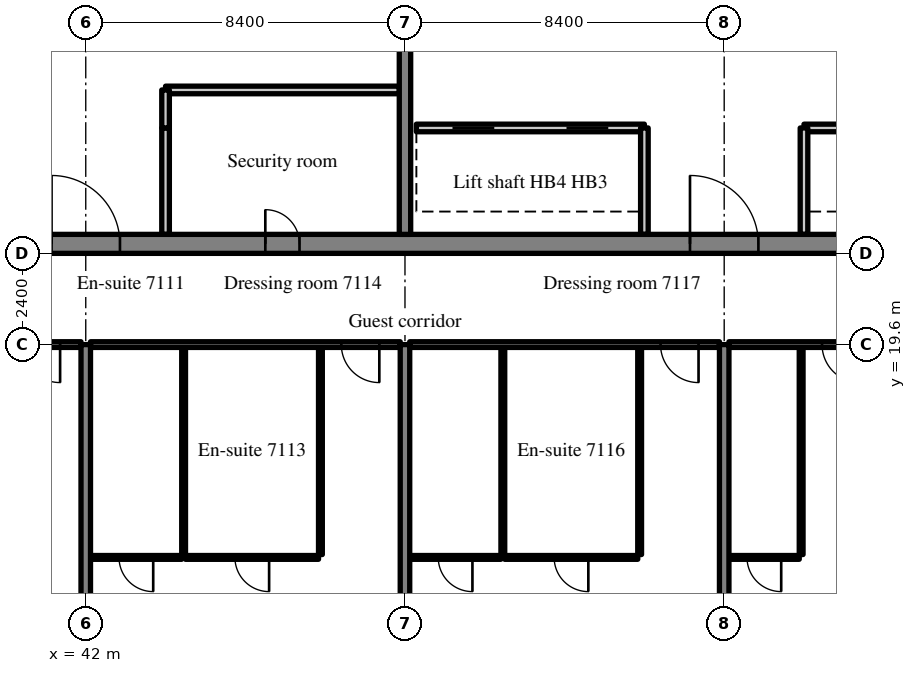
"""IFC4 building model, lengths in metres.
Left out: names, types, materials, properties, quantities, classifications, styles, units other than length and angle.
Written with IfcOpenShell. Run it as: python <this file> out.ifc"""

import sys

from ifc_helpers import new_model, si_unit, direction, frame, frame_2d, origin, place, context, subcontext, project, spatial, rectangle, extrude, source, transform, mapped, element, fill, save


model = new_model("IFC4")
c1 = context("Model", 3, precision=1e-05, world=origin(), true_north=direction((0.0, 1.0)))
c2 = subcontext(c1, "Body", "Model", "MODEL_VIEW")
j1 = project(units=[si_unit("LENGTHUNIT", "METRE"), si_unit("PLANEANGLEUNIT", "RADIAN")], contexts=[c1])
p1 = place(None, origin())
s1 = spatial("IfcSite", under=j1, at=p1, CompositionType="ELEMENT")
p2 = place(p1, origin())
s2 = spatial("IfcBuilding", under=s1, at=p2, CompositionType="ELEMENT")
p3 = place(p2, frame((0.0, 0.0, 297.7)))
s3 = spatial("IfcBuildingStorey", under=s2, at=p3, CompositionType="ELEMENT", Elevation=297.7)
m1 = source(origin(), c2, "Body", "SweptSolid", [
    extrude(rectangle(XDim=50.4, YDim=0.5, at=frame_2d((25.2, 0.0))), origin(), (0.0, 0.0, 1.0), 3.72),
])
p4 = place(p3, frame((25.2, 22.25, 0.0), z_axis=(0.0, 0.0, 1.0), x_axis=(1.0, 0.0, 0.0)))
e1 = element("IfcWall", 1, at=p4, inside=s3, PredefinedType="SHEAR", context=c2, shape_type="MappedRepresentation", body=[
    mapped(m1, transform((0.0, 0.0, 0.0), scale=1.0)),
])
m2 = source(origin(), c2, "Body", "SweptSolid", [
    extrude(rectangle(XDim=1.8, YDim=2.1, at=frame_2d((0.9, 1.05))), frame((0.0, 0.26, 0.0), z_axis=(0.0, -1.0, 0.0), x_axis=(1.0, 0.0, 0.0)), (0.0, 0.0, 1.0), 0.52),
])
p5 = place(p4, frame((15.9, 0.0, 0.0)))
e2 = element("IfcOpeningElement", 2, at=p5, cuts=e1, PredefinedType="OPENING", context=c2, shape_type="MappedRepresentation", body=[
    mapped(m2, transform((0.0, 0.0, 0.0), scale=1.0)),
])
m3 = source(origin(), c2, "Body", "SweptSolid", [
    extrude(rectangle(XDim=0.9, YDim=2.1, at=frame_2d((0.45, 1.05))), frame((0.0, 0.26, 0.0), z_axis=(0.0, -1.0, 0.0), x_axis=(1.0, 0.0, 0.0)), (0.0, 0.0, 1.0), 0.52),
])
p6 = place(p4, frame((9.675, 0.0, 0.0)))
e3 = element("IfcOpeningElement", 3, at=p6, cuts=e1, PredefinedType="OPENING", context=c2, shape_type="MappedRepresentation", body=[
    mapped(m3, transform((0.0, 0.0, 0.0), scale=1.0)),
])
p7 = place(p4, frame((21.525, 0.0, 0.0)))
e4 = element("IfcOpeningElement", 4, at=p7, cuts=e1, PredefinedType="OPENING", context=c2, shape_type="MappedRepresentation", body=[
    mapped(m3, transform((0.0, 0.0, 0.0), scale=1.0)),
])
p8 = place(p4, frame((32.7, 0.0, 0.0)))
e5 = element("IfcOpeningElement", 5, at=p8, cuts=e1, PredefinedType="OPENING", context=c2, shape_type="MappedRepresentation", body=[
    mapped(m2, transform((0.0, 0.0, 0.0), scale=1.0)),
])
m4 = source(origin(), c2, "Body", "SweptSolid", [
    extrude(rectangle(XDim=1.2, YDim=2.1, at=frame_2d((0.6, 1.05))), frame((0.0, 0.26, 0.0), z_axis=(0.0, -1.0, 0.0), x_axis=(1.0, 0.0, 0.0)), (0.0, 0.0, 1.0), 0.52),
])
p9 = place(p4, frame((6.5, 0.0, 0.0)))
e6 = element("IfcOpeningElement", 6, at=p9, cuts=e1, PredefinedType="OPENING", context=c2, shape_type="MappedRepresentation", body=[
    mapped(m4, transform((0.0, 0.0, 0.0), scale=1.0)),
])
p10 = place(p4, frame((47.975, 0.0, 0.0)))
e7 = element("IfcOpeningElement", 7, at=p10, cuts=e1, PredefinedType="OPENING", context=c2, shape_type="MappedRepresentation", body=[
    mapped(m4, transform((0.0, 0.0, 0.0), scale=1.0)),
])
m5 = source(origin(), c2, "Body", "SweptSolid", [
    extrude(rectangle(XDim=19.0, YDim=0.3, at=frame_2d((9.5, 0.0))), origin(), (0.0, 0.0, 1.0), 3.72),
])
p11 = place(p3, frame((50.4, 22.5, 0.0), z_axis=(0.0, 0.0, 1.0), x_axis=(0.0, 1.0, 0.0)))
e8 = element("IfcWall", 8, at=p11, inside=s3, PredefinedType="SHEAR", context=c2, shape_type="MappedRepresentation", body=[
    mapped(m5, transform((0.0, 0.0, 0.0), scale=1.0)),
])
m6 = source(origin(), c2, "Body", "SweptSolid", [
    extrude(rectangle(XDim=1.1, YDim=2.1, at=frame_2d((0.55, 1.05))), frame((0.0, 0.16, 0.0), z_axis=(0.0, -1.0, 0.0), x_axis=(1.0, 0.0, 0.0)), (0.0, 0.0, 1.0), 0.32),
])
p12 = place(p11, frame((12.95, 0.0, 0.0)))
e9 = element("IfcOpeningElement", 9, at=p12, cuts=e8, PredefinedType="OPENING", context=c2, shape_type="MappedRepresentation", body=[
    mapped(m6, transform((0.0, 0.0, 0.0), scale=1.0)),
])
m7 = source(origin(), c2, "Body", "SweptSolid", [
    extrude(rectangle(XDim=14.1, YDim=0.25, at=frame_2d((7.05, 0.0))), origin(), (0.0, 0.0, 1.0), 3.72),
])
p13 = place(p3, frame((42.0, 5.5, 0.0), z_axis=(0.0, 0.0, 1.0), x_axis=(0.0, 1.0, 0.0)))
e10 = element("IfcWall", 10, at=p13, inside=s3, PredefinedType="SHEAR", context=c2, shape_type="MappedRepresentation", body=[
    mapped(m7, transform((0.0, 0.0, 0.0), scale=1.0)),
])
m8 = source(origin(), c2, "Body", "SweptSolid", [
    extrude(rectangle(XDim=13.1, YDim=0.25, at=frame_2d((6.55, 0.0))), origin(), (0.0, 0.0, 1.0), 3.72),
])
p14 = place(p3, frame((50.4, 6.5, 0.0), z_axis=(0.0, 0.0, 1.0), x_axis=(0.0, 1.0, 0.0)))
e11 = element("IfcWall", 11, at=p14, inside=s3, PredefinedType="SHEAR", context=c2, shape_type="MappedRepresentation", body=[
    mapped(m8, transform((0.0, 0.0, 0.0), scale=1.0)),
])
p15 = place(p3, frame((58.8, 5.5, 0.0), z_axis=(0.0, 0.0, 1.0), x_axis=(0.0, 1.0, 0.0)))
e12 = element("IfcWall", 12, at=p15, inside=s3, PredefinedType="SHEAR", context=c2, shape_type="MappedRepresentation", body=[
    mapped(m7, transform((0.0, 0.0, 0.0), scale=1.0)),
])
m9 = source(origin(), c2, "Body", "SweptSolid", [
    extrude(rectangle(XDim=2.8, YDim=0.2, at=frame_2d((1.4, 0.0))), origin(), (0.0, 0.0, 1.0), 3.72),
])
p16 = place(p3, frame((44.1, 22.5, 0.0), z_axis=(0.0, 0.0, 1.0), x_axis=(0.0, 1.0, 0.0)))
e13 = element("IfcWall", 13, at=p16, inside=s3, PredefinedType="PARTITIONING", context=c2, shape_type="MappedRepresentation", body=[
    mapped(m9, transform((0.0, 0.0, 0.0), scale=1.0)),
])
m10 = source(origin(), c2, "Body", "SweptSolid", [
    extrude(rectangle(XDim=6.15, YDim=0.2, at=frame_2d((3.075, 0.0))), origin(), (0.0, 0.0, 1.0), 3.72),
])
p17 = place(p3, frame((44.1, 26.3, 0.0), z_axis=(0.0, 0.0, 1.0), x_axis=(1.0, 0.0, 0.0)))
e14 = element("IfcWall", 14, at=p17, inside=s3, PredefinedType="PARTITIONING", context=c2, shape_type="MappedRepresentation", body=[
    mapped(m10, transform((0.0, 0.0, 0.0), scale=1.0)),
])
m11 = source(origin(), c2, "Body", "SweptSolid", [
    extrude(rectangle(XDim=1.0, YDim=0.2, at=frame_2d((0.5, 0.0))), origin(), (0.0, 0.0, 1.0), 3.72),
])
p18 = place(p3, frame((44.1, 25.3, 0.0), z_axis=(0.0, 0.0, 1.0), x_axis=(0.0, 1.0, 0.0)))
e15 = element("IfcWall", 15, at=p18, inside=s3, PredefinedType="PARTITIONING", context=c2, shape_type="MappedRepresentation", body=[
    mapped(m11, transform((0.0, 0.0, 0.0), scale=1.0)),
])
m12 = source(origin(), c2, "Body", "SweptSolid", [
    extrude(rectangle(XDim=6.15, YDim=0.2, at=frame_2d((3.075, 0.0))), origin(), (0.0, 0.0, 1.0), 3.72),
])
p19 = place(p3, frame((67.05, 25.3, 0.0), z_axis=(0.0, 0.0, 1.0), x_axis=(-1.0, 0.0, 0.0)))
e16 = element("IfcWall", 16, at=p19, inside=s3, PredefinedType="SOLIDWALL", context=c2, shape_type="MappedRepresentation", body=[
    mapped(m12, transform((0.0, 0.0, 0.0), scale=1.0)),
])
m13 = source(origin(), c2, "Body", "SweptSolid", [
    extrude(rectangle(XDim=1.1, YDim=2.1, at=frame_2d((0.55, 1.05))), frame((0.0, 0.11, 0.0), z_axis=(0.0, -1.0, 0.0), x_axis=(1.0, 0.0, 0.0)), (0.0, 0.0, 1.0), 0.22),
])
p20 = place(p19, frame((1.1, 0.0, 0.0)))
e17 = element("IfcOpeningElement", 17, at=p20, cuts=e16, PredefinedType="OPENING", context=c2, shape_type="MappedRepresentation", body=[
    mapped(m13, transform((0.0, 0.0, 0.0), scale=1.0)),
])
p21 = place(p19, frame((4.1, 0.0, 0.0)))
e18 = element("IfcOpeningElement", 18, at=p21, cuts=e16, PredefinedType="OPENING", context=c2, shape_type="MappedRepresentation", body=[
    mapped(m13, transform((0.0, 0.0, 0.0), scale=1.0)),
])
m14 = source(origin(), c2, "Body", "SweptSolid", [
    extrude(rectangle(XDim=6.0, YDim=0.2, at=frame_2d((3.0, 0.0))), origin(), (0.0, 0.0, 1.0), 3.72),
])
p22 = place(p3, frame((56.7, 25.3, 0.0), z_axis=(0.0, 0.0, 1.0), x_axis=(-1.0, 0.0, 0.0)))
e19 = element("IfcWall", 19, at=p22, inside=s3, PredefinedType="SOLIDWALL", context=c2, shape_type="MappedRepresentation", body=[
    mapped(m14, transform((0.0, 0.0, 0.0), scale=1.0)),
])
p23 = place(p22, frame((0.95, 0.0, 0.0)))
e20 = element("IfcOpeningElement", 20, at=p23, cuts=e19, PredefinedType="OPENING", context=c2, shape_type="MappedRepresentation", body=[
    mapped(m13, transform((0.0, 0.0, 0.0), scale=1.0)),
])
p24 = place(p22, frame((3.95, 0.0, 0.0)))
e21 = element("IfcOpeningElement", 21, at=p24, cuts=e19, PredefinedType="OPENING", context=c2, shape_type="MappedRepresentation", body=[
    mapped(m13, transform((0.0, 0.0, 0.0), scale=1.0)),
])
for number, where, z_axis, x_axis in (
    (22, (60.9, 22.5, 0.0), (0.0, 0.0, 1.0), (0.0, 1.0, 0.0)),
    (23, (56.7, 22.5, 0.0), (0.0, 0.0, 1.0), (0.0, 1.0, 0.0)),
):
    element("IfcWall", number, at=place(p3, frame(where, z_axis=z_axis, x_axis=x_axis)), inside=s3, PredefinedType="SOLIDWALL", context=c2, shape_type="MappedRepresentation", body=[
        mapped(m9, transform((0.0, 0.0, 0.0), scale=1.0)),
    ])
m15 = source(origin(), c2, "Body", "SweptSolid", [
    extrude(rectangle(XDim=4.0, YDim=0.15, at=frame_2d((2.0, 0.0))), origin(), (0.0, 0.0, 1.0), 3.02),
])
p25 = place(p3, frame((37.875, 19.6, 0.0), z_axis=(0.0, 0.0, 1.0), x_axis=(1.0, 0.0, 0.0)))
e24 = element("IfcWall", 24, at=p25, inside=s3, PredefinedType="PARTITIONING", context=c2, shape_type="MappedRepresentation", body=[
    mapped(m15, transform((0.0, 0.0, 0.0), scale=1.0)),
])
m16 = source(origin(), c2, "Body", "SweptSolid", [
    extrude(rectangle(XDim=1.0, YDim=2.1, at=frame_2d((0.5, 1.05))), frame((0.0, 0.085, 0.0), z_axis=(0.0, -1.0, 0.0), x_axis=(1.0, 0.0, 0.0)), (0.0, 0.0, 1.0), 0.17),
])
p26 = place(p25, frame((2.45, 0.0, 0.0)))
e25 = element("IfcOpeningElement", 25, at=p26, cuts=e24, PredefinedType="OPENING", context=c2, shape_type="MappedRepresentation", body=[
    mapped(m16, transform((0.0, 0.0, 0.0), scale=1.0)),
])
m17 = source(origin(), c2, "Body", "SweptSolid", [
    extrude(rectangle(XDim=5.45, YDim=0.1, at=frame_2d((2.725, 0.0))), origin(), (0.0, 0.0, 1.0), 3.72),
])
for number, where, z_axis, x_axis in (
    (26, (48.175, 14.075, 0.0), (0.0, 0.0, 1.0), (0.0, 1.0, 0.0)),
    (27, (44.575, 14.075, 0.0), (0.0, 0.0, 1.0), (0.0, 1.0, 0.0)),
):
    element("IfcWall", number, at=place(p3, frame(where, z_axis=z_axis, x_axis=x_axis)), inside=s3, PredefinedType="PARTITIONING", context=c2, shape_type="MappedRepresentation", body=[
        mapped(m17, transform((0.0, 0.0, 0.0), scale=1.0)),
    ])
m18 = source(origin(), c2, "Body", "SweptSolid", [
    extrude(rectangle(XDim=3.5, YDim=0.1, at=frame_2d((1.75, 0.0))), origin(), (0.0, 0.0, 1.0), 3.72),
])
p27 = place(p3, frame((44.625, 14.0, 0.0), z_axis=(0.0, 0.0, 1.0), x_axis=(1.0, 0.0, 0.0)))
e28 = element("IfcWall", 28, at=p27, inside=s3, PredefinedType="PARTITIONING", context=c2, shape_type="MappedRepresentation", body=[
    mapped(m18, transform((0.0, 0.0, 0.0), scale=1.0)),
])
m19 = source(origin(), c2, "Body", "SweptSolid", [
    extrude(rectangle(XDim=0.9, YDim=2.1, at=frame_2d((0.45, 1.05))), frame((0.0, 0.06, 0.0), z_axis=(0.0, -1.0, 0.0), x_axis=(1.0, 0.0, 0.0)), (0.0, 0.0, 1.0), 0.12),
])
p28 = place(p27, frame((1.3, 0.0, 0.0)))
e29 = element("IfcOpeningElement", 29, at=p28, cuts=e28, PredefinedType="OPENING", context=c2, shape_type="MappedRepresentation", body=[
    mapped(m19, transform((0.0, 0.0, 0.0), scale=1.0)),
])
m20 = source(origin(), c2, "Body", "SweptSolid", [
    extrude(rectangle(XDim=2.4, YDim=0.1, at=frame_2d((1.2, 0.0))), origin(), (0.0, 0.0, 1.0), 3.72),
])
p29 = place(p3, frame((42.125, 14.0, 0.0), z_axis=(0.0, 0.0, 1.0), x_axis=(1.0, 0.0, 0.0)))
e30 = element("IfcWall", 30, at=p29, inside=s3, PredefinedType="PARTITIONING", context=c2, shape_type="MappedRepresentation", body=[
    mapped(m20, transform((0.0, 0.0, 0.0), scale=1.0)),
])
p30 = place(p29, frame((0.75, 0.0, 0.0)))
e31 = element("IfcOpeningElement", 31, at=p30, cuts=e30, PredefinedType="OPENING", context=c2, shape_type="MappedRepresentation", body=[
    mapped(m19, transform((0.0, 0.0, 0.0), scale=1.0)),
])
m21 = source(origin(), c2, "Body", "SweptSolid", [
    extrude(rectangle(XDim=8.15, YDim=0.15, at=frame_2d((4.075, 0.0))), origin(), (0.0, 0.0, 1.0), 3.02),
])
p31 = place(p3, frame((42.125, 19.6, 0.0), z_axis=(0.0, 0.0, 1.0), x_axis=(1.0, 0.0, 0.0)))
e32 = element("IfcWall", 32, at=p31, inside=s3, PredefinedType="PARTITIONING", context=c2, shape_type="MappedRepresentation", body=[
    mapped(m21, transform((0.0, 0.0, 0.0), scale=1.0)),
])
p32 = place(p31, frame((6.6, 0.0, 0.0)))
e33 = element("IfcOpeningElement", 33, at=p32, cuts=e32, PredefinedType="OPENING", context=c2, shape_type="MappedRepresentation", body=[
    mapped(m16, transform((0.0, 0.0, 0.0), scale=1.0)),
])
for number, where, z_axis, x_axis in (
    (34, (56.575, 14.075, 0.0), (0.0, 0.0, 1.0), (0.0, 1.0, 0.0)),
    (35, (52.975, 14.075, 0.0), (0.0, 0.0, 1.0), (0.0, 1.0, 0.0)),
):
    element("IfcWall", number, at=place(p3, frame(where, z_axis=z_axis, x_axis=x_axis)), inside=s3, PredefinedType="PARTITIONING", context=c2, shape_type="MappedRepresentation", body=[
        mapped(m17, transform((0.0, 0.0, 0.0), scale=1.0)),
    ])
p33 = place(p3, frame((53.025, 14.0, 0.0), z_axis=(0.0, 0.0, 1.0), x_axis=(1.0, 0.0, 0.0)))
e36 = element("IfcWall", 36, at=p33, inside=s3, PredefinedType="PARTITIONING", context=c2, shape_type="MappedRepresentation", body=[
    mapped(m18, transform((0.0, 0.0, 0.0), scale=1.0)),
])
p34 = place(p33, frame((1.3, 0.0, 0.0)))
e37 = element("IfcOpeningElement", 37, at=p34, cuts=e36, PredefinedType="OPENING", context=c2, shape_type="MappedRepresentation", body=[
    mapped(m19, transform((0.0, 0.0, 0.0), scale=1.0)),
])
m22 = source(origin(), c2, "Body", "SweptSolid", [
    extrude(rectangle(XDim=2.4, YDim=0.1, at=frame_2d((1.2, 0.0))), origin(), (0.0, 0.0, 1.0), 3.72),
])
p35 = place(p3, frame((50.525, 14.0, 0.0), z_axis=(0.0, 0.0, 1.0), x_axis=(1.0, 0.0, 0.0)))
e38 = element("IfcWall", 38, at=p35, inside=s3, PredefinedType="PARTITIONING", context=c2, shape_type="MappedRepresentation", body=[
    mapped(m22, transform((0.0, 0.0, 0.0), scale=1.0)),
])
p36 = place(p35, frame((0.75, 0.0, 0.0)))
e39 = element("IfcOpeningElement", 39, at=p36, cuts=e38, PredefinedType="OPENING", context=c2, shape_type="MappedRepresentation", body=[
    mapped(m19, transform((0.0, 0.0, 0.0), scale=1.0)),
])
m23 = source(origin(), c2, "Body", "SweptSolid", [
    extrude(rectangle(XDim=8.15, YDim=0.15, at=frame_2d((4.075, 0.0))), origin(), (0.0, 0.0, 1.0), 3.02),
])
p37 = place(p3, frame((50.525, 19.6, 0.0), z_axis=(0.0, 0.0, 1.0), x_axis=(1.0, 0.0, 0.0)))
e40 = element("IfcWall", 40, at=p37, inside=s3, PredefinedType="PARTITIONING", context=c2, shape_type="MappedRepresentation", body=[
    mapped(m23, transform((0.0, 0.0, 0.0), scale=1.0)),
])
p38 = place(p37, frame((6.6, 0.0, 0.0)))
e41 = element("IfcOpeningElement", 41, at=p38, cuts=e40, PredefinedType="OPENING", context=c2, shape_type="MappedRepresentation", body=[
    mapped(m16, transform((0.0, 0.0, 0.0), scale=1.0)),
])
p39 = place(p3, frame((60.825, 14.075, 0.0), z_axis=(0.0, 0.0, 1.0), x_axis=(0.0, 1.0, 0.0)))
e42 = element("IfcWall", 42, at=p39, inside=s3, PredefinedType="PARTITIONING", context=c2, shape_type="MappedRepresentation", body=[
    mapped(m17, transform((0.0, 0.0, 0.0), scale=1.0)),
])
m24 = source(origin(), c2, "Body", "SweptSolid", [
    extrude(rectangle(XDim=1.85, YDim=0.1, at=frame_2d((0.925, 0.0))), origin(), (0.0, 0.0, 1.0), 3.72),
])
p40 = place(p3, frame((58.925, 14.0, 0.0), z_axis=(0.0, 0.0, 1.0), x_axis=(1.0, 0.0, 0.0)))
e43 = element("IfcWall", 43, at=p40, inside=s3, PredefinedType="PARTITIONING", context=c2, shape_type="MappedRepresentation", body=[
    mapped(m24, transform((0.0, 0.0, 0.0), scale=1.0)),
])
p41 = place(p40, frame((0.475, 0.0, 0.0)))
e44 = element("IfcOpeningElement", 44, at=p41, cuts=e43, PredefinedType="OPENING", context=c2, shape_type="MappedRepresentation", body=[
    mapped(m19, transform((0.0, 0.0, 0.0), scale=1.0)),
])
p42 = place(p3, frame((58.925, 19.6, 0.0), z_axis=(0.0, 0.0, 1.0), x_axis=(1.0, 0.0, 0.0)))
e45 = element("IfcWall", 45, at=p42, inside=s3, PredefinedType="PARTITIONING", context=c2, shape_type="MappedRepresentation", body=[
    mapped(m15, transform((0.0, 0.0, 0.0), scale=1.0)),
])
p43 = place(p42, frame((2.45, 0.0, 0.0)))
e46 = element("IfcOpeningElement", 46, at=p43, cuts=e45, PredefinedType="OPENING", context=c2, shape_type="MappedRepresentation", body=[
    mapped(m16, transform((0.0, 0.0, 0.0), scale=1.0)),
])
m25 = source(origin(), c2, "Body", "SweptSolid", [
    extrude(rectangle(XDim=1.8, YDim=2.1, at=frame_2d((0.9, 1.05))), frame((0.0, 0.175, 0.0), z_axis=(0.0, -1.0, 0.0), x_axis=(1.0, 0.0, 0.0)), (0.0, 0.0, 1.0), 0.05),
])
p44 = place(p5, origin())
e47 = element("IfcDoor", 47, at=p44, inside=s3, OperationType="DOUBLE_DOOR_SINGLE_SWING", PredefinedType="DOOR", context=c2, shape_type="MappedRepresentation", body=[
    mapped(m25, transform((0.0, 0.0, 0.0), scale=1.0)),
])
fill(e2, e47)
m26 = source(origin(), c2, "Body", "SweptSolid", [
    extrude(rectangle(XDim=0.9, YDim=2.1, at=frame_2d((0.45, 1.05))), frame((0.0, 0.175, 0.0), z_axis=(0.0, -1.0, 0.0), x_axis=(1.0, 0.0, 0.0)), (0.0, 0.0, 1.0), 0.05),
])
p45 = place(p7, origin())
e48 = element("IfcDoor", 48, at=p45, inside=s3, OperationType="SINGLE_SWING_LEFT", PredefinedType="DOOR", context=c2, shape_type="MappedRepresentation", body=[
    mapped(m26, transform((0.0, 0.0, 0.0), scale=1.0)),
])
fill(e4, e48)
p46 = place(p8, origin())
e49 = element("IfcDoor", 49, at=p46, inside=s3, OperationType="DOUBLE_DOOR_SINGLE_SWING", PredefinedType="DOOR", context=c2, shape_type="MappedRepresentation", body=[
    mapped(m25, transform((0.0, 0.0, 0.0), scale=1.0)),
])
fill(e5, e49)
m27 = source(origin(), c2, "Body", "SweptSolid", [
    extrude(rectangle(XDim=1.1, YDim=2.1, at=frame_2d((0.55, 1.05))), frame((0.0, 0.025, 0.0), z_axis=(0.0, -1.0, 0.0), x_axis=(1.0, 0.0, 0.0)), (0.0, 0.0, 1.0), 0.05),
])
p47 = place(p23, origin())
e50 = element("IfcDoor", 50, at=p47, inside=s3, OperationType="SLIDING_TO_RIGHT", PredefinedType="DOOR", context=c2, shape_type="MappedRepresentation", body=[
    mapped(m27, transform((0.0, 0.0, 0.0), scale=1.0)),
])
fill(e20, e50)
p48 = place(p24, origin())
e51 = element("IfcDoor", 51, at=p48, inside=s3, OperationType="SLIDING_TO_LEFT", PredefinedType="DOOR", context=c2, shape_type="MappedRepresentation", body=[
    mapped(m27, transform((0.0, 0.0, 0.0), scale=1.0)),
])
fill(e21, e51)
m28 = source(origin(), c2, "Body", "SweptSolid", [
    extrude(rectangle(XDim=1.0, YDim=2.1, at=frame_2d((0.5, 1.05))), frame((0.0, 0.025, 0.0), z_axis=(0.0, -1.0, 0.0), x_axis=(1.0, 0.0, 0.0)), (0.0, 0.0, 1.0), 0.05),
])
p49 = place(p26, origin())
e52 = element("IfcDoor", 52, at=p49, inside=s3, OperationType="SINGLE_SWING_RIGHT", PredefinedType="DOOR", context=c2, shape_type="MappedRepresentation", body=[
    mapped(m28, transform((0.0, 0.0, 0.0), scale=1.0)),
])
fill(e25, e52)
m29 = source(origin(), c2, "Body", "SweptSolid", [
    extrude(rectangle(XDim=0.9, YDim=2.1, at=frame_2d((0.45, 1.05))), frame((0.0, 0.025, 0.0), z_axis=(0.0, -1.0, 0.0), x_axis=(1.0, 0.0, 0.0)), (0.0, 0.0, 1.0), 0.05),
])
p50 = place(p28, origin())
e53 = element("IfcDoor", 53, at=p50, inside=s3, OperationType="SINGLE_SWING_RIGHT", PredefinedType="DOOR", context=c2, shape_type="MappedRepresentation", body=[
    mapped(m29, transform((0.0, 0.0, 0.0), scale=1.0)),
])
fill(e29, e53)
p51 = place(p30, origin())
e54 = element("IfcDoor", 54, at=p51, inside=s3, OperationType="SINGLE_SWING_RIGHT", PredefinedType="DOOR", context=c2, shape_type="MappedRepresentation", body=[
    mapped(m29, transform((0.0, 0.0, 0.0), scale=1.0)),
])
fill(e31, e54)
p52 = place(p32, origin())
e55 = element("IfcDoor", 55, at=p52, inside=s3, OperationType="SINGLE_SWING_RIGHT", PredefinedType="DOOR", context=c2, shape_type="MappedRepresentation", body=[
    mapped(m28, transform((0.0, 0.0, 0.0), scale=1.0)),
])
fill(e33, e55)
p53 = place(p34, origin())
e56 = element("IfcDoor", 56, at=p53, inside=s3, OperationType="SINGLE_SWING_RIGHT", PredefinedType="DOOR", context=c2, shape_type="MappedRepresentation", body=[
    mapped(m29, transform((0.0, 0.0, 0.0), scale=1.0)),
])
fill(e37, e56)
p54 = place(p36, origin())
e57 = element("IfcDoor", 57, at=p54, inside=s3, OperationType="SINGLE_SWING_RIGHT", PredefinedType="DOOR", context=c2, shape_type="MappedRepresentation", body=[
    mapped(m29, transform((0.0, 0.0, 0.0), scale=1.0)),
])
fill(e39, e57)
p55 = place(p38, origin())
e58 = element("IfcDoor", 58, at=p55, inside=s3, OperationType="SINGLE_SWING_RIGHT", PredefinedType="DOOR", context=c2, shape_type="MappedRepresentation", body=[
    mapped(m28, transform((0.0, 0.0, 0.0), scale=1.0)),
])
fill(e41, e58)
p56 = place(p41, origin())
e59 = element("IfcDoor", 59, at=p56, inside=s3, OperationType="SINGLE_SWING_RIGHT", PredefinedType="DOOR", context=c2, shape_type="MappedRepresentation", body=[
    mapped(m29, transform((0.0, 0.0, 0.0), scale=1.0)),
])
fill(e44, e59)
p57 = place(p43, origin())
e60 = element("IfcDoor", 60, at=p57, inside=s3, OperationType="SINGLE_SWING_RIGHT", PredefinedType="DOOR", context=c2, shape_type="MappedRepresentation", body=[
    mapped(m28, transform((0.0, 0.0, 0.0), scale=1.0)),
])
fill(e46, e60)
save(model, sys.argv[1])
